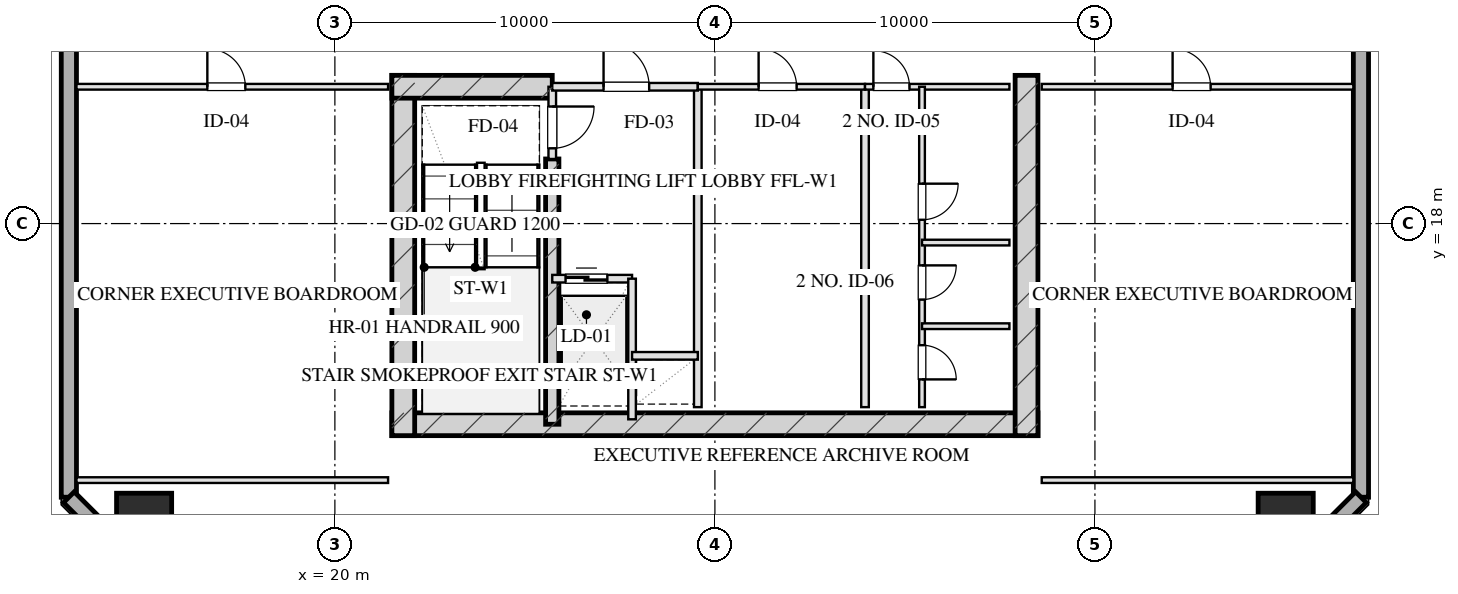
"""IFC4 building model, lengths in metres.
Left out: names, types, materials, properties, quantities, classifications, styles, units other than length and angle.
Written with IfcOpenShell. Run it as: python <this file> out.ifc"""

import sys

from ifc_helpers import new_model, si_unit, direction, frame, frame_2d, origin, origin_2d, place, context, subcontext, project, spatial, rectangle, hollow_rectangle, extrude, element, fill, save


model = new_model("IFC4")
c1 = context("Model", 3, precision=1e-05, world=origin(), true_north=direction((0.0, 1.0)))
c2 = subcontext(c1, "Body", "Model", "MODEL_VIEW")
j1 = project(units=[si_unit("LENGTHUNIT", "METRE"), si_unit("PLANEANGLEUNIT", "RADIAN")], contexts=[c1])
p1 = place(None, origin())
s1 = spatial("IfcSite", under=j1, at=p1, CompositionType="ELEMENT")
p2 = place(p1, origin())
s2 = spatial("IfcBuilding", under=s1, at=p2, CompositionType="ELEMENT")
p3 = place(p2, frame((0.0, 0.0, 163.3)))
s3 = spatial("IfcBuildingStorey", under=s2, at=p3, CompositionType="ELEMENT", Elevation=163.3)
p4 = place(p3, frame((21.5, 12.72, 0.0), z_axis=(0.0, 0.0, 1.0), x_axis=(1.0, 0.0, 0.0)))
e1 = element("IfcWall", 1, at=p4, inside=s3, PredefinedType="SHEAR", context=c2, shape_type="SweptSolid", body=[
    extrude(rectangle(XDim=17.0, YDim=0.6, at=frame_2d((8.5, 0.0))), origin(), (0.0, 0.0, 1.0), 3.45),
])
for number, where, z_axis, x_axis in (
    (2, (21.8, 21.9, 0.0), (0.0, 0.0, 1.0), (0.0, -1.0, 0.0)),
    (3, (38.2, 21.9, 0.0), (0.0, 0.0, 1.0), (0.0, -1.0, 0.0)),
):
    element("IfcWall", number, at=place(p3, frame(where, z_axis=z_axis, x_axis=x_axis)), inside=s3, PredefinedType="SHEAR", context=c2, shape_type="SweptSolid", body=[
        extrude(rectangle(XDim=9.48, YDim=0.6, at=frame_2d((4.74, 0.0))), origin(), (0.0, 0.0, 1.0), 3.45),
    ])
p5 = place(p3, frame((25.72, 19.7, 0.0), z_axis=(0.0, 0.0, 1.0), x_axis=(0.0, -1.0, 0.0)))
e4 = element("IfcWall", 4, at=p5, inside=s3, PredefinedType="SHEAR", context=c2, shape_type="SweptSolid", body=[
    extrude(rectangle(XDim=6.98, YDim=0.35, at=frame_2d((3.49, 0.0))), origin(), (0.0, 0.0, 1.0), 3.45),
])
p6 = place(p3, frame((21.5, 21.6, 0.0), z_axis=(0.0, 0.0, 1.0), x_axis=(1.0, 0.0, 0.0)))
e5 = element("IfcWall", 5, at=p6, inside=s3, PredefinedType="SHEAR", context=c2, shape_type="SweptSolid", body=[
    extrude(rectangle(XDim=4.22, YDim=0.6, at=frame_2d((2.11, 0.0))), origin(), (0.0, 0.0, 1.0), 3.45),
])
for number, where, z_axis, x_axis in (
    (6, (14.98, 10.18, 0.0), (0.0, 0.0, 1.0), (1.0, 0.0, 0.0)),
    (7, (45.02, 10.18, 0.0), (0.0, 0.0, 1.0), (1.0, 0.0, 0.0)),
):
    element("IfcColumn", number, at=place(p3, frame(where, z_axis=z_axis, x_axis=x_axis)), inside=s3, PredefinedType="COLUMN", context=c2, shape_type="SweptSolid", body=[
        extrude(hollow_rectangle(XDim=1.45, YDim=1.45, WallThickness=0.05, at=origin_2d()), origin(), (0.0, 0.0, 1.0), 3.451),
    ])
p7 = place(p3, frame((13.0, 10.8, 0.0), z_axis=(0.0, 0.0, 1.0), x_axis=(0.0, 1.0, 0.0)))
e8 = element("IfcWall", 8, at=p7, inside=s3, PredefinedType="SOLIDWALL", context=c2, shape_type="SweptSolid", body=[
    extrude(rectangle(XDim=46.4, YDim=0.4, at=frame_2d((23.2, 0.0))), origin(), (0.0, 0.0, 1.0), 2.61),
])
p8 = place(p7, frame((28.45, 0.0, 0.0)))
e9 = element("IfcOpeningElement", 9, at=p8, cuts=e8, PredefinedType="OPENING", context=c2, shape_type="SweptSolid", body=[
    extrude(rectangle(XDim=1.1, YDim=2.15, at=frame_2d((0.55, 1.075))), frame((0.0, 0.21, 0.0), z_axis=(0.0, -1.0, 0.0), x_axis=(1.0, 0.0, 0.0)), (0.0, 0.0, 1.0), 0.42),
])
p9 = place(p3, frame((47.0, 57.2, 0.0), z_axis=(0.0, 0.0, 1.0), x_axis=(0.0, -1.0, 0.0)))
e10 = element("IfcWall", 10, at=p9, inside=s3, PredefinedType="SOLIDWALL", context=c2, shape_type="SweptSolid", body=[
    extrude(rectangle(XDim=46.4, YDim=0.4, at=frame_2d((23.2, 0.0))), origin(), (0.0, 0.0, 1.0), 2.61),
])
p10 = place(p9, frame((28.475, 0.0, 0.75)))
e11 = element("IfcOpeningElement", 11, at=p10, cuts=e10, PredefinedType="OPENING", context=c2, shape_type="SweptSolid", body=[
    extrude(rectangle(XDim=2.25, YDim=1.46, at=frame_2d((1.125, 0.73))), frame((0.0, 0.21, 0.0), z_axis=(0.0, -1.0, 0.0), x_axis=(1.0, 0.0, 0.0)), (0.0, 0.0, 1.0), 0.42),
])
p11 = place(p9, frame((24.675, 0.0, 0.75)))
e12 = element("IfcOpeningElement", 12, at=p11, cuts=e10, PredefinedType="OPENING", context=c2, shape_type="SweptSolid", body=[
    extrude(rectangle(XDim=2.25, YDim=1.46, at=frame_2d((1.125, 0.73))), frame((0.0, 0.21, 0.0), z_axis=(0.0, -1.0, 0.0), x_axis=(1.0, 0.0, 0.0)), (0.0, 0.0, 1.0), 0.42),
])
p12 = place(p9, frame((18.25, 0.0, 0.0)))
e13 = element("IfcOpeningElement", 13, at=p12, cuts=e10, PredefinedType="OPENING", context=c2, shape_type="SweptSolid", body=[
    extrude(rectangle(XDim=1.1, YDim=2.15, at=frame_2d((0.55, 1.075))), frame((0.0, 0.21, 0.0), z_axis=(0.0, -1.0, 0.0), x_axis=(1.0, 0.0, 0.0)), (0.0, 0.0, 1.0), 0.42),
])
for number, where, z_axis, x_axis in (
    (14, (47.0, 10.8, 0.0), (0.0, 0.0, 1.0), (-0.707, -0.707, 0.0)),
    (15, (15.6, 8.2, 0.0), (0.0, 0.0, 1.0), (-0.707, 0.707, 0.0)),
):
    element("IfcWall", number, at=place(p3, frame(where, z_axis=z_axis, x_axis=x_axis)), inside=s3, PredefinedType="SOLIDWALL", context=c2, shape_type="SweptSolid", body=[
        extrude(rectangle(XDim=3.677, YDim=0.4, at=frame_2d((1.838, 0.0))), origin(), (0.0, 0.0, 1.0), 2.61),
    ])
p13 = place(p3, frame((25.72, 21.6, 0.0), z_axis=(0.0, 0.0, 1.0), x_axis=(0.0, -1.0, 0.0)))
e16 = element("IfcWall", 16, at=p13, inside=s3, PredefinedType="PARTITIONING", context=c2, shape_type="SweptSolid", body=[
    extrude(rectangle(XDim=1.9, YDim=0.2, at=frame_2d((0.95, 0.0))), origin(), (0.0, 0.0, 1.0), 3.175),
])
p14 = place(p13, frame((0.52, 0.0, 0.0)))
e17 = element("IfcOpeningElement", 17, at=p14, cuts=e16, PredefinedType="OPENING", context=c2, shape_type="SweptSolid", body=[
    extrude(rectangle(XDim=1.1, YDim=2.05, at=frame_2d((0.55, 1.025))), frame((0.0, 0.11, 0.0), z_axis=(0.0, -1.0, 0.0), x_axis=(1.0, 0.0, 0.0)), (0.0, 0.0, 1.0), 0.22),
])
p15 = place(p3, frame((29.55, 21.6, 0.0), z_axis=(0.0, 0.0, 1.0), x_axis=(0.0, -1.0, 0.0)))
e18 = element("IfcWall", 18, at=p15, inside=s3, PredefinedType="PARTITIONING", context=c2, shape_type="SweptSolid", body=[
    extrude(rectangle(XDim=8.43, YDim=0.2, at=frame_2d((4.215, 0.0))), origin(), (0.0, 0.0, 1.0), 3.175),
])
p16 = place(p3, frame((25.72, 21.6, 0.0), z_axis=(0.0, 0.0, 1.0), x_axis=(1.0, 0.0, 0.0)))
e19 = element("IfcWall", 19, at=p16, inside=s3, PredefinedType="PARTITIONING", context=c2, shape_type="SweptSolid", body=[
    extrude(rectangle(XDim=3.83, YDim=0.2, at=frame_2d((1.915, 0.0))), origin(), (0.0, 0.0, 1.0), 3.175),
])
p17 = place(p16, frame((1.35, 0.0, 0.0)))
e20 = element("IfcOpeningElement", 20, at=p17, cuts=e19, PredefinedType="OPENING", context=c2, shape_type="SweptSolid", body=[
    extrude(rectangle(XDim=1.2, YDim=2.05, at=frame_2d((0.6, 1.025))), frame((0.0, 0.11, 0.0), z_axis=(0.0, -1.0, 0.0), x_axis=(1.0, 0.0, 0.0)), (0.0, 0.0, 1.0), 0.22),
])
p18 = place(p3, frame((25.72, 16.55, 0.0), z_axis=(0.0, 0.0, 1.0), x_axis=(1.0, 0.0, 0.0)))
e21 = element("IfcWall", 21, at=p18, inside=s3, PredefinedType="PARTITIONING", context=c2, shape_type="SweptSolid", body=[
    extrude(rectangle(XDim=2.1, YDim=0.2, at=frame_2d((1.05, 0.0))), origin(), (0.0, 0.0, 1.0), 3.175),
])
p19 = place(p18, frame((0.35, 0.0, 0.0)))
e22 = element("IfcOpeningElement", 22, at=p19, cuts=e21, PredefinedType="OPENING", context=c2, shape_type="SweptSolid", body=[
    extrude(rectangle(XDim=1.1, YDim=2.05, at=frame_2d((0.55, 1.025))), frame((0.0, 0.11, 0.0), z_axis=(0.0, -1.0, 0.0), x_axis=(1.0, 0.0, 0.0)), (0.0, 0.0, 1.0), 0.22),
])
p20 = place(p3, frame((27.82, 16.55, 0.0), z_axis=(0.0, 0.0, 1.0), x_axis=(0.0, -1.0, 0.0)))
e23 = element("IfcWall", 23, at=p20, inside=s3, PredefinedType="PARTITIONING", context=c2, shape_type="SweptSolid", body=[
    extrude(rectangle(XDim=3.7, YDim=0.2, at=frame_2d((1.85, 0.0))), origin(), (0.0, 0.0, 1.0), 3.175),
])
p21 = place(p3, frame((27.82, 14.52, 0.0), z_axis=(0.0, 0.0, 1.0), x_axis=(1.0, 0.0, 0.0)))
e24 = element("IfcWall", 24, at=p21, inside=s3, PredefinedType="PARTITIONING", context=c2, shape_type="SweptSolid", body=[
    extrude(rectangle(XDim=1.73, YDim=0.2, at=frame_2d((0.865, 0.0))), origin(), (0.0, 0.0, 1.0), 3.175),
])
p22 = place(p3, frame((33.95, 21.6, 0.0), z_axis=(0.0, 0.0, 1.0), x_axis=(0.0, -1.0, 0.0)))
e25 = element("IfcWall", 25, at=p22, inside=s3, PredefinedType="PARTITIONING", context=c2, shape_type="SweptSolid", body=[
    extrude(rectangle(XDim=8.43, YDim=0.2, at=frame_2d((4.215, 0.0))), origin(), (0.0, 0.0, 1.0), 3.175),
])
p23 = place(p3, frame((29.55, 21.6, 0.0), z_axis=(0.0, 0.0, 1.0), x_axis=(1.0, 0.0, 0.0)))
e26 = element("IfcWall", 26, at=p23, inside=s3, PredefinedType="PARTITIONING", context=c2, shape_type="SweptSolid", body=[
    extrude(rectangle(XDim=4.4, YDim=0.15, at=frame_2d((2.2, 0.0))), origin(), (0.0, 0.0, 1.0), 3.175),
])
p24 = place(p23, frame((1.6, 0.0, 0.0)))
e27 = element("IfcOpeningElement", 27, at=p24, cuts=e26, PredefinedType="OPENING", context=c2, shape_type="SweptSolid", body=[
    extrude(rectangle(XDim=1.0, YDim=2.05, at=frame_2d((0.5, 1.025))), frame((0.0, 0.085, 0.0), z_axis=(0.0, -1.0, 0.0), x_axis=(1.0, 0.0, 0.0)), (0.0, 0.0, 1.0), 0.17),
])
p25 = place(p3, frame((33.95, 21.6, 0.0), z_axis=(0.0, 0.0, 1.0), x_axis=(1.0, 0.0, 0.0)))
e28 = element("IfcWall", 28, at=p25, inside=s3, PredefinedType="PARTITIONING", context=c2, shape_type="SweptSolid", body=[
    extrude(rectangle(XDim=3.8, YDim=0.15, at=frame_2d((1.9, 0.0))), origin(), (0.0, 0.0, 1.0), 3.175),
])
p26 = place(p25, frame((0.22, 0.0, 0.0)))
e29 = element("IfcOpeningElement", 29, at=p26, cuts=e28, PredefinedType="OPENING", context=c2, shape_type="SweptSolid", body=[
    extrude(rectangle(XDim=0.95, YDim=2.05, at=frame_2d((0.475, 1.025))), frame((0.0, 0.085, 0.0), z_axis=(0.0, -1.0, 0.0), x_axis=(1.0, 0.0, 0.0)), (0.0, 0.0, 1.0), 0.17),
])
p27 = place(p3, frame((35.45, 21.6, 0.0), z_axis=(0.0, 0.0, 1.0), x_axis=(0.0, -1.0, 0.0)))
e30 = element("IfcWall", 30, at=p27, inside=s3, PredefinedType="PARTITIONING", context=c2, shape_type="SweptSolid", body=[
    extrude(rectangle(XDim=8.43, YDim=0.15, at=frame_2d((4.215, 0.0))), origin(), (0.0, 0.0, 1.0), 2.815),
])
p28 = place(p27, frame((2.55, 0.0, 0.0)))
e31 = element("IfcOpeningElement", 31, at=p28, cuts=e30, PredefinedType="OPENING", context=c2, shape_type="SweptSolid", body=[
    extrude(rectangle(XDim=0.95, YDim=2.05, at=frame_2d((0.475, 1.025))), frame((0.0, 0.085, 0.0), z_axis=(0.0, -1.0, 0.0), x_axis=(1.0, 0.0, 0.0)), (0.0, 0.0, 1.0), 0.17),
])
p29 = place(p27, frame((4.7, 0.0, 0.0)))
e32 = element("IfcOpeningElement", 32, at=p29, cuts=e30, PredefinedType="OPENING", context=c2, shape_type="SweptSolid", body=[
    extrude(rectangle(XDim=0.9, YDim=2.05, at=frame_2d((0.45, 1.025))), frame((0.0, 0.085, 0.0), z_axis=(0.0, -1.0, 0.0), x_axis=(1.0, 0.0, 0.0)), (0.0, 0.0, 1.0), 0.17),
])
p30 = place(p27, frame((6.8, 0.0, 0.0)))
e33 = element("IfcOpeningElement", 33, at=p30, cuts=e30, PredefinedType="OPENING", context=c2, shape_type="SweptSolid", body=[
    extrude(rectangle(XDim=0.9, YDim=2.05, at=frame_2d((0.45, 1.025))), frame((0.0, 0.085, 0.0), z_axis=(0.0, -1.0, 0.0), x_axis=(1.0, 0.0, 0.0)), (0.0, 0.0, 1.0), 0.17),
])
for number, where, z_axis, x_axis in (
    (34, (35.45, 17.5, 0.0), (0.0, 0.0, 1.0), (1.0, 0.0, 0.0)),
    (35, (35.45, 15.3, 0.0), (0.0, 0.0, 1.0), (1.0, 0.0, 0.0)),
):
    element("IfcWall", number, at=place(p3, frame(where, z_axis=z_axis, x_axis=x_axis)), inside=s3, PredefinedType="PARTITIONING", context=c2, shape_type="SweptSolid", body=[
        extrude(rectangle(XDim=2.3, YDim=0.15, at=frame_2d((1.15, 0.0))), origin(), (0.0, 0.0, 1.0), 3.175),
    ])
p31 = place(p3, frame((13.2, 11.25, 0.0), z_axis=(0.0, 0.0, 1.0), x_axis=(1.0, 0.0, 0.0)))
e36 = element("IfcWall", 36, at=p31, inside=s3, PredefinedType="PARTITIONING", context=c2, shape_type="SweptSolid", body=[
    extrude(rectangle(XDim=8.2, YDim=0.15, at=frame_2d((4.1, 0.0))), origin(), (0.0, 0.0, 1.0), 3.175),
])
p32 = place(p3, frame((13.2, 21.6, 0.0), z_axis=(0.0, 0.0, 1.0), x_axis=(1.0, 0.0, 0.0)))
e37 = element("IfcWall", 37, at=p32, inside=s3, PredefinedType="PARTITIONING", context=c2, shape_type="SweptSolid", body=[
    extrude(rectangle(XDim=8.2, YDim=0.15, at=frame_2d((4.1, 0.0))), origin(), (0.0, 0.0, 1.0), 3.175),
])
p33 = place(p32, frame((3.444, 0.0, 0.0)))
e38 = element("IfcOpeningElement", 38, at=p33, cuts=e37, PredefinedType="OPENING", context=c2, shape_type="SweptSolid", body=[
    extrude(rectangle(XDim=1.0, YDim=2.05, at=frame_2d((0.5, 1.025))), frame((0.0, 0.085, 0.0), z_axis=(0.0, -1.0, 0.0), x_axis=(1.0, 0.0, 0.0)), (0.0, 0.0, 1.0), 0.17),
])
p34 = place(p3, frame((38.6, 11.25, 0.0), z_axis=(0.0, 0.0, 1.0), x_axis=(1.0, 0.0, 0.0)))
e39 = element("IfcWall", 39, at=p34, inside=s3, PredefinedType="PARTITIONING", context=c2, shape_type="SweptSolid", body=[
    extrude(rectangle(XDim=8.2, YDim=0.15, at=frame_2d((4.1, 0.0))), origin(), (0.0, 0.0, 1.0), 3.175),
])
p35 = place(p3, frame((38.6, 21.6, 0.0), z_axis=(0.0, 0.0, 1.0), x_axis=(1.0, 0.0, 0.0)))
e40 = element("IfcWall", 40, at=p35, inside=s3, PredefinedType="PARTITIONING", context=c2, shape_type="SweptSolid", body=[
    extrude(rectangle(XDim=8.2, YDim=0.15, at=frame_2d((4.1, 0.0))), origin(), (0.0, 0.0, 1.0), 3.175),
])
p36 = place(p35, frame((3.444, 0.0, 0.0)))
e41 = element("IfcOpeningElement", 41, at=p36, cuts=e40, PredefinedType="OPENING", context=c2, shape_type="SweptSolid", body=[
    extrude(rectangle(XDim=1.0, YDim=2.05, at=frame_2d((0.5, 1.025))), frame((0.0, 0.085, 0.0), z_axis=(0.0, -1.0, 0.0), x_axis=(1.0, 0.0, 0.0)), (0.0, 0.0, 1.0), 0.17),
])
p37 = place(p14, origin())
e42 = element("IfcDoor", 42, at=p37, inside=s3, OperationType="SINGLE_SWING_LEFT", PredefinedType="DOOR", context=c2, shape_type="SweptSolid", body=[
    extrude(rectangle(XDim=1.1, YDim=2.05, at=frame_2d((0.55, 1.025))), frame((0.0, 0.025, 0.0), z_axis=(0.0, -1.0, 0.0), x_axis=(1.0, 0.0, 0.0)), (0.0, 0.0, 1.0), 0.05),
])
fill(e17, e42)
p38 = place(p17, origin())
e43 = element("IfcDoor", 43, at=p38, inside=s3, OperationType="SINGLE_SWING_LEFT", PredefinedType="DOOR", context=c2, shape_type="SweptSolid", body=[
    extrude(rectangle(XDim=1.2, YDim=2.05, at=frame_2d((0.6, 1.025))), frame((0.0, 0.025, 0.0), z_axis=(0.0, -1.0, 0.0), x_axis=(1.0, 0.0, 0.0)), (0.0, 0.0, 1.0), 0.05),
])
fill(e20, e43)
p39 = place(p19, origin())
e44 = element("IfcDoor", 44, at=p39, inside=s3, OperationType="DOUBLE_DOOR_SLIDING", PredefinedType="DOOR", context=c2, shape_type="SweptSolid", body=[
    extrude(rectangle(XDim=1.1, YDim=2.05, at=frame_2d((0.55, 1.025))), frame((0.0, 0.025, 0.0), z_axis=(0.0, -1.0, 0.0), x_axis=(1.0, 0.0, 0.0)), (0.0, 0.0, 1.0), 0.05),
])
fill(e22, e44)
p40 = place(p24, origin())
e45 = element("IfcDoor", 45, at=p40, inside=s3, OperationType="SINGLE_SWING_LEFT", PredefinedType="DOOR", context=c2, shape_type="SweptSolid", body=[
    extrude(rectangle(XDim=1.0, YDim=2.05, at=frame_2d((0.5, 1.025))), frame((0.0, 0.025, 0.0), z_axis=(0.0, -1.0, 0.0), x_axis=(1.0, 0.0, 0.0)), (0.0, 0.0, 1.0), 0.05),
])
fill(e27, e45)
p41 = place(p26, origin())
e46 = element("IfcDoor", 46, at=p41, inside=s3, OperationType="SINGLE_SWING_LEFT", PredefinedType="DOOR", context=c2, shape_type="SweptSolid", body=[
    extrude(rectangle(XDim=0.95, YDim=2.05, at=frame_2d((0.475, 1.025))), frame((0.0, 0.025, 0.0), z_axis=(0.0, -1.0, 0.0), x_axis=(1.0, 0.0, 0.0)), (0.0, 0.0, 1.0), 0.05),
])
fill(e29, e46)
p42 = place(p28, origin())
e47 = element("IfcDoor", 47, at=p42, inside=s3, OperationType="SINGLE_SWING_LEFT", PredefinedType="DOOR", context=c2, shape_type="SweptSolid", body=[
    extrude(rectangle(XDim=0.95, YDim=2.05, at=frame_2d((0.475, 1.025))), frame((0.0, 0.025, 0.0), z_axis=(0.0, -1.0, 0.0), x_axis=(1.0, 0.0, 0.0)), (0.0, 0.0, 1.0), 0.05),
])
fill(e31, e47)
p43 = place(p29, origin())
e48 = element("IfcDoor", 48, at=p43, inside=s3, OperationType="SINGLE_SWING_LEFT", PredefinedType="DOOR", context=c2, shape_type="SweptSolid", body=[
    extrude(rectangle(XDim=0.9, YDim=2.05, at=frame_2d((0.45, 1.025))), frame((0.0, 0.025, 0.0), z_axis=(0.0, -1.0, 0.0), x_axis=(1.0, 0.0, 0.0)), (0.0, 0.0, 1.0), 0.05),
])
fill(e32, e48)
p44 = place(p30, origin())
e49 = element("IfcDoor", 49, at=p44, inside=s3, OperationType="SINGLE_SWING_RIGHT", PredefinedType="DOOR", context=c2, shape_type="SweptSolid", body=[
    extrude(rectangle(XDim=0.9, YDim=2.05, at=frame_2d((0.45, 1.025))), frame((0.0, 0.025, 0.0), z_axis=(0.0, -1.0, 0.0), x_axis=(1.0, 0.0, 0.0)), (0.0, 0.0, 1.0), 0.05),
])
fill(e33, e49)
p45 = place(p33, origin())
e50 = element("IfcDoor", 50, at=p45, inside=s3, OperationType="SINGLE_SWING_LEFT", PredefinedType="DOOR", context=c2, shape_type="SweptSolid", body=[
    extrude(rectangle(XDim=1.0, YDim=2.05, at=frame_2d((0.5, 1.025))), frame((0.0, 0.025, 0.0), z_axis=(0.0, -1.0, 0.0), x_axis=(1.0, 0.0, 0.0)), (0.0, 0.0, 1.0), 0.05),
])
fill(e38, e50)
p46 = place(p36, origin())
e51 = element("IfcDoor", 51, at=p46, inside=s3, OperationType="SINGLE_SWING_LEFT", PredefinedType="DOOR", context=c2, shape_type="SweptSolid", body=[
    extrude(rectangle(XDim=1.0, YDim=2.05, at=frame_2d((0.5, 1.025))), frame((0.0, 0.025, 0.0), z_axis=(0.0, -1.0, 0.0), x_axis=(1.0, 0.0, 0.0)), (0.0, 0.0, 1.0), 0.05),
])
fill(e41, e51)
save(model, sys.argv[1])
